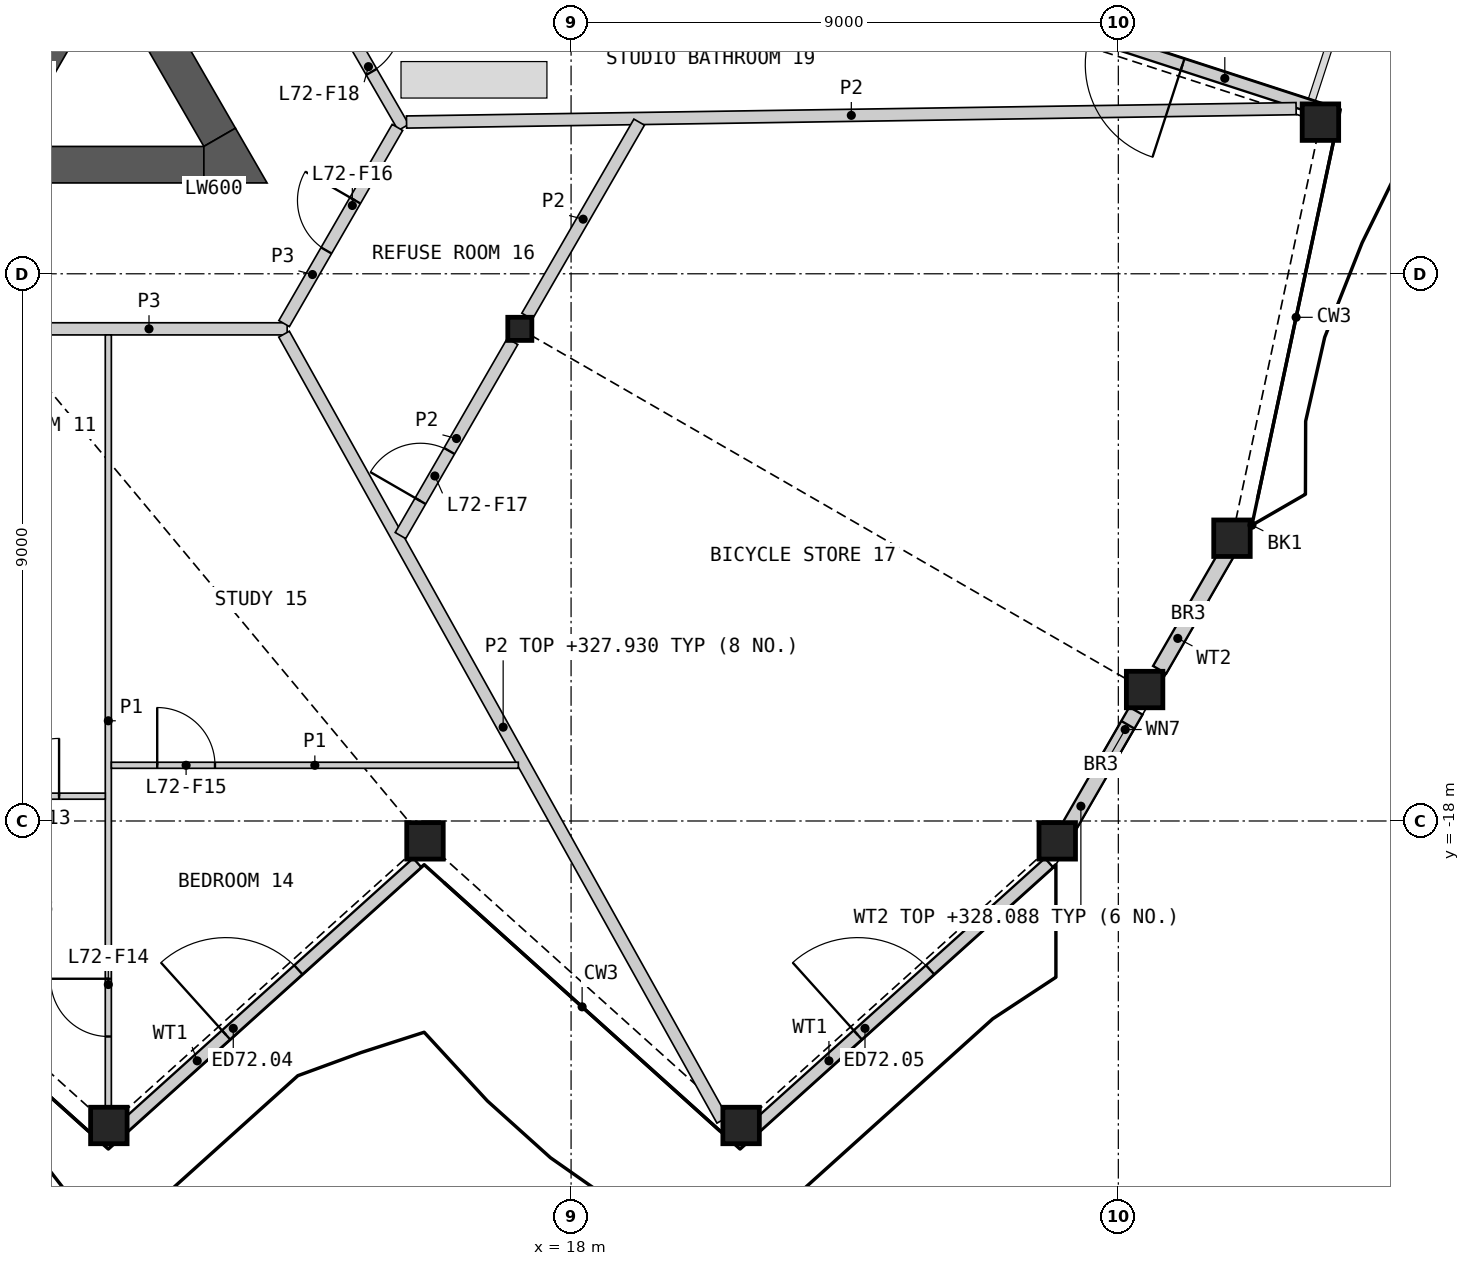
"""IFC4 building model, lengths in metres.
Left out: names, types, materials, properties, quantities, classifications, styles, units other than length and angle.
Written with IfcOpenShell. Run it as: python <this file> out.ifc"""

import sys

from ifc_helpers import new_model, si_unit, direction, frame, frame_2d, origin, origin_2d, place, context, subcontext, project, spatial, polyline, rectangle, hollow_rectangle, i_section, outline, extrude, element, fill, save


model = new_model("IFC4")
c1 = context("Model", 3, precision=1e-05, world=origin(), true_north=direction((0.0, 1.0)))
c2 = subcontext(c1, "Body", "Model", "MODEL_VIEW")
j1 = project(units=[si_unit("LENGTHUNIT", "METRE"), si_unit("PLANEANGLEUNIT", "RADIAN")], contexts=[c1])
p1 = place(None, origin())
s1 = spatial("IfcSite", under=j1, at=p1, CompositionType="ELEMENT")
p2 = place(p1, origin())
s2 = spatial("IfcBuilding", under=s1, at=p2, CompositionType="ELEMENT")
p3 = place(p2, frame((0.0, 0.0, 325.6)))
s3 = spatial("IfcBuildingStorey", under=s2, at=p3, CompositionType="ELEMENT", Elevation=325.6)
for number, where, z_axis, x_axis in (
    (1, (10.398, -23.008, 0.0), (0.0, 0.0, 1.0), (1.0, 0.0, 0.0)),
    (2, (15.597, -18.327, 0.0), (0.0, 0.0, 1.0), (1.0, 0.0, 0.0)),
    (3, (20.796, -23.008, 0.0), (0.0, 0.0, 1.0), (1.0, 0.0, 0.0)),
    (4, (25.995, -18.327, 0.0), (0.0, 0.0, 1.0), (1.0, 0.0, 0.0)),
    (5, (27.432, -15.838, 0.0), (0.0, 0.0, 1.0), (1.0, 0.0, 0.0)),
    (6, (28.869, -13.349, 0.0), (0.0, 0.0, 1.0), (1.0, 0.0, 0.0)),
    (7, (30.324, -6.506, 0.0), (0.0, 0.0, 1.0), (1.0, 0.0, 0.0)),
):
    element("IfcColumn", number, at=place(p3, frame(where, z_axis=z_axis, x_axis=x_axis)), inside=s3, PredefinedType="COLUMN", context=c2, shape_type="SweptSolid", body=[
        extrude(hollow_rectangle(XDim=0.6, YDim=0.6, WallThickness=0.04, at=origin_2d()), origin(), (0.0, 0.0, 1.0), 3.4),
    ])
p4 = place(p3, frame((17.157, -9.906, 0.0), z_axis=(0.0, 0.0, 1.0), x_axis=(1.0, 0.0, 0.0)))
e8 = element("IfcColumn", 8, at=p4, inside=s3, PredefinedType="COLUMN", context=c2, shape_type="SweptSolid", body=[
    extrude(i_section(OverallWidth=0.396, OverallDepth=0.381, WebThickness=0.019, FlangeThickness=0.03, at=origin_2d()), origin(), (0.0, 0.0, 1.0), 3.4),
])
p5 = place(p3, frame((10.645, -23.031, 0.0), z_axis=(0.0, 0.0, 1.0), x_axis=(0.743138937876, 0.669137145145, 0.0)))
e9 = element("IfcWall", 9, at=p5, inside=s3, PredefinedType="SOLIDWALL", context=c2, shape_type="SweptSolid", body=[
    extrude(rectangle(XDim=6.493, YDim=0.2, at=frame_2d((3.246, 0.0))), origin(), (0.0, 0.0, 1.0), 2.488),
])
p6 = place(p5, frame((2.261, 0.0, 0.0)))
e10 = element("IfcOpeningElement", 10, at=p6, cuts=e9, PredefinedType="OPENING", context=c2, shape_type="SweptSolid", body=[
    extrude(rectangle(XDim=1.6, YDim=2.25, at=frame_2d((0.8, 1.125))), frame((0.0, 0.11, 0.0), z_axis=(0.0, -1.0, 0.0), x_axis=(1.0, 0.0, 0.0)), (0.0, 0.0, 1.0), 0.22),
])
p7 = place(p3, frame((21.034, -23.031, 0.0), z_axis=(0.0, 0.0, 1.0), x_axis=(0.743138937876, 0.669137145145, 0.0)))
e11 = element("IfcWall", 11, at=p7, inside=s3, PredefinedType="SOLIDWALL", context=c2, shape_type="SweptSolid", body=[
    extrude(rectangle(XDim=6.493, YDim=0.2, at=frame_2d((3.246, 0.0))), origin(), (0.0, 0.0, 1.0), 2.488),
])
p8 = place(p7, frame((2.261, 0.0, 0.0)))
e12 = element("IfcOpeningElement", 12, at=p8, cuts=e11, PredefinedType="OPENING", context=c2, shape_type="SweptSolid", body=[
    extrude(rectangle(XDim=1.6, YDim=2.25, at=frame_2d((0.8, 1.125))), frame((0.0, 0.11, 0.0), z_axis=(0.0, -1.0, 0.0), x_axis=(1.0, 0.0, 0.0)), (0.0, 0.0, 1.0), 0.22),
])
p9 = place(p3, frame((26.082, -18.28, 0.0), z_axis=(0.0, 0.0, 1.0), x_axis=(0.50001992892, 0.866013897511, 0.0)))
e13 = element("IfcWall", 13, at=p9, inside=s3, PredefinedType="SOLIDWALL", context=c2, shape_type="SweptSolid", body=[
    extrude(rectangle(XDim=2.416, YDim=0.25, at=frame_2d((1.208, 0.0))), origin(), (0.0, 0.0, 1.0), 2.488),
])
p10 = place(p9, frame((1.25, 0.0, 1.6)))
e14 = element("IfcOpeningElement", 14, at=p10, cuts=e13, PredefinedType="OPENING", context=c2, shape_type="SweptSolid", body=[
    extrude(rectangle(XDim=0.9, YDim=0.6, at=frame_2d((0.45, 0.3))), frame((0.0, 0.135, 0.0), z_axis=(0.0, -1.0, 0.0), x_axis=(1.0, 0.0, 0.0)), (0.0, 0.0, 1.0), 0.27),
])
p11 = place(p3, frame((27.68, -15.513, 0.0), z_axis=(0.0, 0.0, 1.0), x_axis=(0.499982446489, 0.866035538072, 0.0)))
e15 = element("IfcWall", 15, at=p11, inside=s3, PredefinedType="SOLIDWALL", context=c2, shape_type="SweptSolid", body=[
    extrude(rectangle(XDim=2.384, YDim=0.25, at=frame_2d((1.192, 0.0))), origin(), (0.0, 0.0, 1.0), 2.488),
])
p12 = place(p3, frame((30.207, -6.258, 0.0), z_axis=(0.0, 0.0, 1.0), x_axis=(-0.951056631566, 0.309016639608, 0.0)))
e16 = element("IfcWall", 16, at=p12, inside=s3, PredefinedType="SOLIDWALL", context=c2, shape_type="SweptSolid", body=[
    extrude(rectangle(XDim=6.122, YDim=0.2, at=frame_2d((3.061, 0.0))), origin(), (0.0, 0.0, 1.0), 2.488),
])
p13 = place(p12, frame((2.261, 0.0, 0.0)))
e17 = element("IfcOpeningElement", 17, at=p13, cuts=e16, PredefinedType="OPENING", context=c2, shape_type="SweptSolid", body=[
    extrude(rectangle(XDim=1.6, YDim=2.25, at=frame_2d((0.8, 1.125))), frame((0.0, 0.11, 0.0), z_axis=(0.0, -1.0, 0.0), x_axis=(1.0, 0.0, 0.0)), (0.0, 0.0, 1.0), 0.22),
])
p14 = place(p3, origin())
e18 = element("IfcWall", 18, at=p14, inside=s3, PredefinedType="SHEAR", context=c2, shape_type="SweptSolid", body=[
    extrude(outline(polyline([(8.83, -6.881), (10.374, -4.206), (10.032, -4.298), (8.738, -6.539), (8.83, -6.881)])), origin(), (0.0, 0.0, 1.0), 3.1),
])
p15 = place(p3, frame((-4.892, -7.206, 0.0), z_axis=(0.0, 0.0, 1.0), x_axis=(1.0, 0.0, 0.0)))
e19 = element("IfcWall", 19, at=p15, inside=s3, PredefinedType="SHEAR", context=c2, shape_type="SweptSolid", body=[
    extrude(rectangle(XDim=16.853, YDim=0.6, at=frame_2d((8.426, 0.0))), origin(), (0.0, 0.0, 1.0), 3.1),
])
p16 = place(p3, frame((12.221, -6.756, 0.0), z_axis=(0.0, 0.0, 1.0), x_axis=(-0.50000604952, 0.866021911064, 0.0)))
e20 = element("IfcWall", 20, at=p16, inside=s3, PredefinedType="SHEAR", context=c2, shape_type="SweptSolid", body=[
    extrude(rectangle(XDim=4.869, YDim=0.6, at=frame_2d((2.434, 0.0))), origin(), (0.0, 0.0, 1.0), 3.1),
])
p17 = place(p3, origin())
e21 = element("IfcWall", 21, at=p17, inside=s3, PredefinedType="SHEAR", context=c2, shape_type="SweptSolid", body=[
    extrude(outline(polyline([(11.961, -7.506), (11.961, -6.906), (12.48, -6.606), (13.0, -7.506), (11.961, -7.506)])), origin(), (0.0, 0.0, 1.0), 3.1),
])
p18 = place(p3, frame((8.786, -9.906, 0.0), z_axis=(0.0, 0.0, 1.0), x_axis=(1.0, 0.0, 0.0)))
e22 = element("IfcWall", 22, at=p18, inside=s3, PredefinedType="PARTITIONING", context=c2, shape_type="SweptSolid", body=[
    extrude(rectangle(XDim=4.545, YDim=0.2, at=frame_2d((2.272, 0.0))), origin(), (0.0, 0.0, 1.0), 3.1),
])
p19 = place(p3, frame((12.988, -2.684, 0.0), z_axis=(0.0, 0.0, 1.0), x_axis=(0.49999094734, -0.866030630277, 0.0)))
e23 = element("IfcWall", 23, at=p19, inside=s3, PredefinedType="PARTITIONING", context=c2, shape_type="SweptSolid", body=[
    extrude(rectangle(XDim=4.513, YDim=0.2, at=frame_2d((2.256, 0.0))), origin(), (0.0, 0.0, 1.0), 3.1),
])
p20 = place(p19, frame((2.459, 0.0, 0.0)))
e24 = element("IfcOpeningElement", 24, at=p20, cuts=e23, PredefinedType="OPENING", context=c2, shape_type="SweptSolid", body=[
    extrude(rectangle(XDim=1.0, YDim=2.1, at=frame_2d((0.5, 1.05))), frame((0.0, 0.11, 0.0), z_axis=(0.0, -1.0, 0.0), x_axis=(1.0, 0.0, 0.0)), (0.0, 0.0, 1.0), 0.22),
])
p21 = place(p3, frame((13.281, -9.819, 0.0), z_axis=(0.0, 0.0, 1.0), x_axis=(0.499958791762, 0.866049194065, 0.0)))
e25 = element("IfcWall", 25, at=p21, inside=s3, PredefinedType="PARTITIONING", context=c2, shape_type="SweptSolid", body=[
    extrude(rectangle(XDim=3.726, YDim=0.2, at=frame_2d((1.863, 0.0))), origin(), (0.0, 0.0, 1.0), 3.1),
])
p22 = place(p21, frame((1.388, 0.0, 0.0)))
e26 = element("IfcOpeningElement", 26, at=p22, cuts=e25, PredefinedType="OPENING", context=c2, shape_type="SweptSolid", body=[
    extrude(rectangle(XDim=0.95, YDim=2.1, at=frame_2d((0.475, 1.05))), frame((0.0, 0.11, 0.0), z_axis=(0.0, -1.0, 0.0), x_axis=(1.0, 0.0, 0.0)), (0.0, 0.0, 1.0), 0.22),
])
p23 = place(p3, frame((13.28, -9.993, 0.0), z_axis=(0.0, 0.0, 1.0), x_axis=(0.486918292843, -0.873447523378, 0.0)))
e27 = element("IfcWall", 27, at=p23, inside=s3, PredefinedType="PARTITIONING", context=c2, shape_type="SweptSolid", body=[
    extrude(rectangle(XDim=14.801, YDim=0.2, at=frame_2d((7.4, 0.0))), origin(), (0.0, 0.0, 1.0), 2.33),
])
p24 = place(p3, frame((15.294, -6.504, 0.0), z_axis=(0.0, 0.0, 1.0), x_axis=(0.999886982846, 0.015034012608, 0.0)))
e28 = element("IfcWall", 28, at=p24, inside=s3, PredefinedType="PARTITIONING", context=c2, shape_type="SweptSolid", body=[
    extrude(rectangle(XDim=14.632, YDim=0.2, at=frame_2d((7.316, 0.0))), origin(), (0.0, 0.0, 1.0), 2.33),
])
p25 = place(p3, frame((15.194, -13.306, 0.0), z_axis=(0.0, 0.0, 1.0), x_axis=(0.50002820729, 0.866009117685, 0.0)))
e29 = element("IfcWall", 29, at=p25, inside=s3, PredefinedType="PARTITIONING", context=c2, shape_type="SweptSolid", body=[
    extrude(rectangle(XDim=3.686, YDim=0.2, at=frame_2d((1.843, 0.0))), origin(), (0.0, 0.0, 1.0), 2.33),
])
p26 = place(p25, frame((0.656, 0.0, 0.0)))
e30 = element("IfcOpeningElement", 30, at=p26, cuts=e29, PredefinedType="OPENING", context=c2, shape_type="SweptSolid", body=[
    extrude(rectangle(XDim=0.95, YDim=2.1, at=frame_2d((0.475, 1.05))), frame((0.0, 0.11, 0.0), z_axis=(0.0, -1.0, 0.0), x_axis=(1.0, 0.0, 0.0)), (0.0, 0.0, 1.0), 0.22),
])
p27 = place(p3, frame((17.277, -9.698, 0.0), z_axis=(0.0, 0.0, 1.0), x_axis=(0.499978535015, 0.866037796245, 0.0)))
e31 = element("IfcWall", 31, at=p27, inside=s3, PredefinedType="PARTITIONING", context=c2, shape_type="SweptSolid", body=[
    extrude(rectangle(XDim=3.686, YDim=0.2, at=frame_2d((1.843, 0.0))), origin(), (0.0, 0.0, 1.0), 2.33),
])
p28 = place(p3, frame((10.389, -22.698, 0.0), z_axis=(0.0, 0.0, 1.0), x_axis=(0.0, 1.0, 0.0)))
e32 = element("IfcWall", 32, at=p28, inside=s3, PredefinedType="PARTITIONING", context=c2, shape_type="SweptSolid", body=[
    extrude(rectangle(XDim=12.692, YDim=0.1, at=frame_2d((6.346, 0.0))), origin(), (0.0, 0.0, 1.0), 2.33),
])
p29 = place(p28, frame((1.153, 0.0, 0.0)))
e33 = element("IfcOpeningElement", 33, at=p29, cuts=e32, PredefinedType="OPENING", context=c2, shape_type="SweptSolid", body=[
    extrude(rectangle(XDim=0.95, YDim=2.1, at=frame_2d((0.475, 1.05))), frame((0.0, 0.06, 0.0), z_axis=(0.0, -1.0, 0.0), x_axis=(1.0, 0.0, 0.0)), (0.0, 0.0, 1.0), 0.12),
])
p30 = place(p3, frame((10.439, -17.084, 0.0), z_axis=(0.0, 0.0, 1.0), x_axis=(1.0, 0.0, 0.0)))
e34 = element("IfcWall", 34, at=p30, inside=s3, PredefinedType="PARTITIONING", context=c2, shape_type="SweptSolid", body=[
    extrude(rectangle(XDim=6.693, YDim=0.1, at=frame_2d((3.346, 0.0))), origin(), (0.0, 0.0, 1.0), 2.33),
])
p31 = place(p30, frame((0.754, 0.0, 0.0)))
e35 = element("IfcOpeningElement", 35, at=p31, cuts=e34, PredefinedType="OPENING", context=c2, shape_type="SweptSolid", body=[
    extrude(rectangle(XDim=0.95, YDim=2.1, at=frame_2d((0.475, 1.05))), frame((0.0, 0.06, 0.0), z_axis=(0.0, -1.0, 0.0), x_axis=(1.0, 0.0, 0.0)), (0.0, 0.0, 1.0), 0.12),
])
p32 = place(p3, frame((5.32, -17.592, 0.0), z_axis=(0.0, 0.0, 1.0), x_axis=(1.0, 0.0, 0.0)))
e36 = element("IfcWall", 36, at=p32, inside=s3, PredefinedType="PARTITIONING", context=c2, shape_type="SweptSolid", body=[
    extrude(rectangle(XDim=5.02, YDim=0.1, at=frame_2d((2.51, 0.0))), origin(), (0.0, 0.0, 1.0), 2.33),
])
p33 = place(p32, frame((3.31, 0.0, 0.0)))
e37 = element("IfcOpeningElement", 37, at=p33, cuts=e36, PredefinedType="OPENING", context=c2, shape_type="SweptSolid", body=[
    extrude(rectangle(XDim=0.95, YDim=2.1, at=frame_2d((0.475, 1.05))), frame((0.0, 0.06, 0.0), z_axis=(0.0, -1.0, 0.0), x_axis=(1.0, 0.0, 0.0)), (0.0, 0.0, 1.0), 0.12),
])
p34 = place(p6, origin())
e38 = element("IfcDoor", 38, at=p34, inside=s3, OperationType="DOUBLE_DOOR_SINGLE_SWING", PredefinedType="DOOR", context=c2, shape_type="SweptSolid", body=[
    extrude(rectangle(XDim=1.6, YDim=2.25, at=frame_2d((0.8, 1.125))), frame((0.0, 0.025, 0.0), z_axis=(0.0, -1.0, 0.0), x_axis=(1.0, 0.0, 0.0)), (0.0, 0.0, 1.0), 0.05),
])
fill(e10, e38)
p35 = place(p8, origin())
e39 = element("IfcDoor", 39, at=p35, inside=s3, OperationType="DOUBLE_DOOR_SINGLE_SWING", PredefinedType="DOOR", context=c2, shape_type="SweptSolid", body=[
    extrude(rectangle(XDim=1.6, YDim=2.25, at=frame_2d((0.8, 1.125))), frame((0.0, 0.025, 0.0), z_axis=(0.0, -1.0, 0.0), x_axis=(1.0, 0.0, 0.0)), (0.0, 0.0, 1.0), 0.05),
])
fill(e12, e39)
p36 = place(p10, origin())
e40 = element("IfcWindow", 40, at=p36, inside=s3, PartitioningType="SINGLE_PANEL", PredefinedType="WINDOW", context=c2, shape_type="SweptSolid", body=[
    extrude(rectangle(XDim=0.9, YDim=0.6, at=frame_2d((0.45, 0.3))), frame((0.0, 0.03, 0.0), z_axis=(0.0, -1.0, 0.0), x_axis=(1.0, 0.0, 0.0)), (0.0, 0.0, 1.0), 0.06),
])
fill(e14, e40)
p37 = place(p13, origin())
e41 = element("IfcDoor", 41, at=p37, inside=s3, OperationType="DOUBLE_DOOR_SINGLE_SWING", PredefinedType="DOOR", context=c2, shape_type="SweptSolid", body=[
    extrude(rectangle(XDim=1.6, YDim=2.25, at=frame_2d((0.8, 1.125))), frame((0.0, 0.025, 0.0), z_axis=(0.0, -1.0, 0.0), x_axis=(1.0, 0.0, 0.0)), (0.0, 0.0, 1.0), 0.05),
])
fill(e17, e41)
p38 = place(p33, origin())
e42 = element("IfcDoor", 42, at=p38, inside=s3, OperationType="SINGLE_SWING_RIGHT", PredefinedType="DOOR", context=c2, shape_type="SweptSolid", body=[
    extrude(rectangle(XDim=0.95, YDim=2.1, at=frame_2d((0.475, 1.05))), frame((0.0, 0.025, 0.0), z_axis=(0.0, -1.0, 0.0), x_axis=(1.0, 0.0, 0.0)), (0.0, 0.0, 1.0), 0.05),
])
fill(e37, e42)
p39 = place(p29, origin())
e43 = element("IfcDoor", 43, at=p39, inside=s3, OperationType="SINGLE_SWING_RIGHT", PredefinedType="DOOR", context=c2, shape_type="SweptSolid", body=[
    extrude(rectangle(XDim=0.95, YDim=2.1, at=frame_2d((0.475, 1.05))), frame((0.0, 0.025, 0.0), z_axis=(0.0, -1.0, 0.0), x_axis=(1.0, 0.0, 0.0)), (0.0, 0.0, 1.0), 0.05),
])
fill(e33, e43)
p40 = place(p31, origin())
e44 = element("IfcDoor", 44, at=p40, inside=s3, OperationType="SINGLE_SWING_LEFT", PredefinedType="DOOR", context=c2, shape_type="SweptSolid", body=[
    extrude(rectangle(XDim=0.95, YDim=2.1, at=frame_2d((0.475, 1.05))), frame((0.0, 0.025, 0.0), z_axis=(0.0, -1.0, 0.0), x_axis=(1.0, 0.0, 0.0)), (0.0, 0.0, 1.0), 0.05),
])
fill(e35, e44)
p41 = place(p22, origin())
e45 = element("IfcDoor", 45, at=p41, inside=s3, OperationType="SINGLE_SWING_RIGHT", PredefinedType="DOOR", context=c2, shape_type="SweptSolid", body=[
    extrude(rectangle(XDim=0.95, YDim=2.1, at=frame_2d((0.475, 1.05))), frame((0.0, 0.025, 0.0), z_axis=(0.0, -1.0, 0.0), x_axis=(1.0, 0.0, 0.0)), (0.0, 0.0, 1.0), 0.05),
])
fill(e26, e45)
p42 = place(p26, origin())
e46 = element("IfcDoor", 46, at=p42, inside=s3, OperationType="SINGLE_SWING_LEFT", PredefinedType="DOOR", context=c2, shape_type="SweptSolid", body=[
    extrude(rectangle(XDim=0.95, YDim=2.1, at=frame_2d((0.475, 1.05))), frame((0.0, 0.025, 0.0), z_axis=(0.0, -1.0, 0.0), x_axis=(1.0, 0.0, 0.0)), (0.0, 0.0, 1.0), 0.05),
])
fill(e30, e46)
p43 = place(p20, origin())
e47 = element("IfcDoor", 47, at=p43, inside=s3, OperationType="SINGLE_SWING_LEFT", PredefinedType="DOOR", context=c2, shape_type="SweptSolid", body=[
    extrude(rectangle(XDim=1.0, YDim=2.1, at=frame_2d((0.5, 1.05))), frame((0.0, 0.025, 0.0), z_axis=(0.0, -1.0, 0.0), x_axis=(1.0, 0.0, 0.0)), (0.0, 0.0, 1.0), 0.05),
])
fill(e24, e47)
save(model, sys.argv[1])
